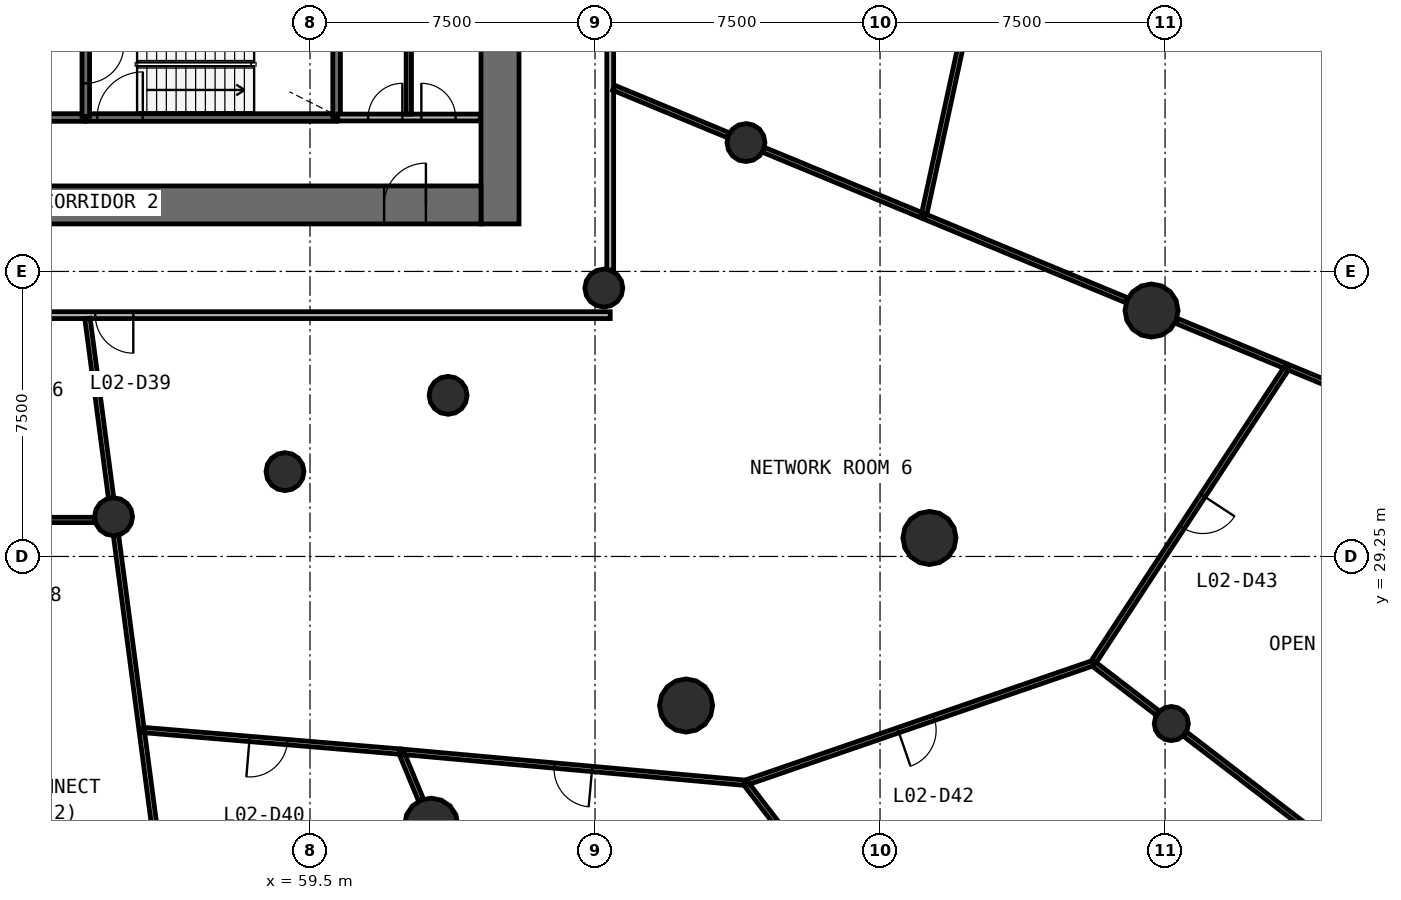
"""IFC4 building model, lengths in metres.
Left out: names, types, materials, properties, quantities, classifications, styles, units other than length and angle.
Written with IfcOpenShell. Run it as: python <this file> out.ifc"""

import sys

from ifc_helpers import new_model, si_unit, direction, frame, frame_2d, origin, origin_2d, place, context, subcontext, project, spatial, rectangle, circle, extrude, source, transform, mapped, element, fill, save


model = new_model("IFC4")
c1 = context("Model", 3, precision=1e-05, world=origin(), true_north=direction((0.0, 1.0)))
c2 = subcontext(c1, "Body", "Model", "MODEL_VIEW")
j1 = project(units=[si_unit("LENGTHUNIT", "METRE"), si_unit("PLANEANGLEUNIT", "RADIAN")], contexts=[c1])
p1 = place(None, origin())
s1 = spatial("IfcSite", under=j1, at=p1, CompositionType="ELEMENT")
p2 = place(p1, origin())
s2 = spatial("IfcBuilding", under=s1, at=p2, CompositionType="ELEMENT")
p3 = place(p2, frame((0.0, 0.0, 9.4)))
s3 = spatial("IfcBuildingStorey", under=s2, at=p3, CompositionType="ELEMENT", Elevation=9.4)
p4 = place(p3, frame((64.5, 38.0, 0.0), z_axis=(0.0, 0.0, 1.0), x_axis=(0.0, 1.0, 0.0)))
e1 = element("IfcWall", 1, at=p4, inside=s3, PredefinedType="SHEAR", context=c2, shape_type="SweptSolid", body=[
    extrude(rectangle(XDim=20.0, YDim=1.0, at=frame_2d((10.0, 0.0))), origin(), (0.0, 0.0, 1.0), 4.4),
])
p5 = place(p4, frame((9.1, 0.0, 0.0)))
e2 = element("IfcOpeningElement", 2, at=p5, cuts=e1, PredefinedType="OPENING", context=c2, shape_type="SweptSolid", body=[
    extrude(rectangle(XDim=1.8, YDim=2.1, at=frame_2d((0.9, 1.05))), frame((0.0, 0.51, 0.0), z_axis=(0.0, -1.0, 0.0), x_axis=(1.0, 0.0, 0.0)), (0.0, 0.0, 1.0), 1.02),
])
p6 = place(p3, frame((40.0, 38.5, 0.0), z_axis=(0.0, 0.0, 1.0), x_axis=(1.0, 0.0, 0.0)))
e3 = element("IfcWall", 3, at=p6, inside=s3, PredefinedType="SHEAR", context=c2, shape_type="SweptSolid", body=[
    extrude(rectangle(XDim=24.0, YDim=1.0, at=frame_2d((12.0, 0.0))), origin(), (0.0, 0.0, 1.0), 4.4),
])
p7 = place(p6, frame((21.45, 0.0, 0.0)))
e4 = element("IfcOpeningElement", 4, at=p7, cuts=e3, PredefinedType="OPENING", context=c2, shape_type="SweptSolid", body=[
    extrude(rectangle(XDim=1.1, YDim=2.1, at=frame_2d((0.55, 1.05))), frame((0.0, 0.51, 0.0), z_axis=(0.0, -1.0, 0.0), x_axis=(1.0, 0.0, 0.0)), (0.0, 0.0, 1.0), 1.02),
])
p8 = place(p6, frame((1.95, 0.0, 0.0)))
e5 = element("IfcOpeningElement", 5, at=p8, cuts=e3, PredefinedType="OPENING", context=c2, shape_type="SweptSolid", body=[
    extrude(rectangle(XDim=1.1, YDim=2.1, at=frame_2d((0.55, 1.05))), frame((0.0, 0.51, 0.0), z_axis=(0.0, -1.0, 0.0), x_axis=(1.0, 0.0, 0.0)), (0.0, 0.0, 1.0), 1.02),
])
m1 = source(origin(), c2, "Body", "SweptSolid", [
    extrude(circle(Radius=0.7, at=origin_2d()), origin(), (0.0, 0.0, 1.0), 4.4),
])
for number, where, z_axis, x_axis in (
    (6, (62.69, 22.191, 0.0), (0.0, 0.0, 1.0), (1.0, 0.0, 0.0)),
    (7, (69.396, 25.328, 0.0), (0.0, 0.0, 1.0), (1.0, 0.0, 0.0)),
    (8, (75.801, 29.737, 0.0), (0.0, 0.0, 1.0), (1.0, 0.0, 0.0)),
    (9, (81.645, 35.721, 0.0), (0.0, 0.0, 1.0), (1.0, 0.0, 0.0)),
):
    element("IfcColumn", number, at=place(p3, frame(where, z_axis=z_axis, x_axis=x_axis)), inside=s3, PredefinedType="COLUMN", context=c2, shape_type="MappedRepresentation", body=[
        mapped(m1, transform((0.0, 0.0, 0.0), scale=1.0)),
    ])
m2 = source(origin(), c2, "Body", "SweptSolid", [
    extrude(circle(Radius=0.5, at=origin_2d()), origin(), (0.0, 0.0, 1.0), 4.4),
])
for number, where, z_axis, x_axis in (
    (10, (54.331, 30.297, 0.0), (0.0, 0.0, 1.0), (1.0, 0.0, 0.0)),
    (11, (58.842, 31.482, 0.0), (0.0, 0.0, 1.0), (1.0, 0.0, 0.0)),
    (12, (63.134, 33.49, 0.0), (0.0, 0.0, 1.0), (1.0, 0.0, 0.0)),
    (13, (67.232, 36.312, 0.0), (0.0, 0.0, 1.0), (1.0, 0.0, 0.0)),
    (14, (70.972, 40.141, 0.0), (0.0, 0.0, 1.0), (1.0, 0.0, 0.0)),
):
    element("IfcColumn", number, at=place(p3, frame(where, z_axis=z_axis, x_axis=x_axis)), inside=s3, PredefinedType="COLUMN", context=c2, shape_type="MappedRepresentation", body=[
        mapped(m2, transform((0.0, 0.0, 0.0), scale=1.0)),
    ])
m3 = source(origin(), c2, "Body", "SweptSolid", [
    extrude(circle(Radius=0.45, at=origin_2d()), origin(), (0.0, 0.0, 1.0), 4.4),
])
p9 = place(p3, frame((82.165, 24.854, 0.0), z_axis=(0.0, 0.0, 1.0), x_axis=(1.0, 0.0, 0.0)))
e15 = element("IfcColumn", 15, at=p9, inside=s3, PredefinedType="COLUMN", context=c2, shape_type="MappedRepresentation", body=[
    mapped(m3, transform((0.0, 0.0, 0.0), scale=1.0)),
])
p10 = place(p3, frame((53.6, 40.8, 0.0), z_axis=(0.0, 0.0, 1.0), x_axis=(1.0, 0.0, 0.0)))
e16 = element("IfcWall", 16, at=p10, inside=s3, PredefinedType="SOLIDWALL", context=c2, shape_type="SweptSolid", body=[
    extrude(rectangle(XDim=6.6, YDim=0.2, at=frame_2d((3.3, 0.0))), origin(), (0.0, 0.0, 1.0), 3.95),
])
p11 = place(p10, frame((0.3, 0.0, 0.0)))
e17 = element("IfcOpeningElement", 17, at=p11, cuts=e16, PredefinedType="OPENING", context=c2, shape_type="SweptSolid", body=[
    extrude(rectangle(XDim=1.2, YDim=2.1, at=frame_2d((0.6, 1.05))), frame((0.0, 0.11, 0.0), z_axis=(0.0, -1.0, 0.0), x_axis=(1.0, 0.0, 0.0)), (0.0, 0.0, 1.0), 0.22),
])
p12 = place(p3, frame((47.9, 40.8, 0.0), z_axis=(0.0, 0.0, 1.0), x_axis=(1.0, 0.0, 0.0)))
e18 = element("IfcWall", 18, at=p12, inside=s3, PredefinedType="SOLIDWALL", context=c2, shape_type="SweptSolid", body=[
    extrude(rectangle(XDim=5.67, YDim=0.2, at=frame_2d((2.835, 0.0))), origin(), (0.0, 0.0, 1.0), 3.95),
])
p13 = place(p12, frame((2.95, 0.0, 0.0)))
e19 = element("IfcOpeningElement", 19, at=p13, cuts=e18, PredefinedType="OPENING", context=c2, shape_type="SweptSolid", body=[
    extrude(rectangle(XDim=1.1, YDim=2.1, at=frame_2d((0.55, 1.05))), frame((0.0, 0.11, 0.0), z_axis=(0.0, -1.0, 0.0), x_axis=(1.0, 0.0, 0.0)), (0.0, 0.0, 1.0), 0.22),
])
p14 = place(p3, frame((60.2, 40.83, 0.0), z_axis=(0.0, 0.0, 1.0), x_axis=(0.0, 1.0, 0.0)))
e20 = element("IfcWall", 20, at=p14, inside=s3, PredefinedType="SOLIDWALL", context=c2, shape_type="SweptSolid", body=[
    extrude(rectangle(XDim=2.77, YDim=0.2, at=frame_2d((1.385, 0.0))), origin(), (0.0, 0.0, 1.0), 3.95),
])
p15 = place(p3, frame((53.6, 43.6, 0.0), z_axis=(0.0, 0.0, 1.0), x_axis=(0.0, -1.0, 0.0)))
e21 = element("IfcWall", 21, at=p15, inside=s3, PredefinedType="SOLIDWALL", context=c2, shape_type="SweptSolid", body=[
    extrude(rectangle(XDim=2.77, YDim=0.2, at=frame_2d((1.385, 0.0))), origin(), (0.0, 0.0, 1.0), 3.95),
])
p16 = place(p15, frame((0.9, 0.0, 0.0)))
e22 = element("IfcOpeningElement", 22, at=p16, cuts=e21, PredefinedType="OPENING", context=c2, shape_type="SweptSolid", body=[
    extrude(rectangle(XDim=1.0, YDim=2.1, at=frame_2d((0.5, 1.05))), frame((0.0, 0.11, 0.0), z_axis=(0.0, -1.0, 0.0), x_axis=(1.0, 0.0, 0.0)), (0.0, 0.0, 1.0), 0.22),
])
p17 = place(p3, frame((67.4, 35.6, 0.0), z_axis=(0.0, 0.0, 1.0), x_axis=(-1.0, 0.0, 0.0)))
e23 = element("IfcWall", 23, at=p17, inside=s3, PredefinedType="PARTITIONING", context=c2, shape_type="SweptSolid", body=[
    extrude(rectangle(XDim=30.8, YDim=0.18, at=frame_2d((15.4, 0.0))), origin(), (0.0, 0.0, 1.0), 3.15),
])
p18 = place(p17, frame((14.95, 0.0, 0.0)))
e24 = element("IfcOpeningElement", 24, at=p18, cuts=e23, PredefinedType="OPENING", context=c2, shape_type="SweptSolid", body=[
    extrude(rectangle(XDim=1.0, YDim=2.1, at=frame_2d((0.5, 1.05))), frame((0.0, 0.1, 0.0), z_axis=(0.0, -1.0, 0.0), x_axis=(1.0, 0.0, 0.0)), (0.0, 0.0, 1.0), 0.2),
])
p19 = place(p17, frame((12.55, 0.0, 0.0)))
e25 = element("IfcOpeningElement", 25, at=p19, cuts=e23, PredefinedType="OPENING", context=c2, shape_type="SweptSolid", body=[
    extrude(rectangle(XDim=1.0, YDim=2.1, at=frame_2d((0.5, 1.05))), frame((0.0, 0.1, 0.0), z_axis=(0.0, -1.0, 0.0), x_axis=(1.0, 0.0, 0.0)), (0.0, 0.0, 1.0), 0.2),
])
p20 = place(p3, frame((67.4, 60.37, 0.0), z_axis=(0.0, 0.0, 1.0), x_axis=(0.0, -1.0, 0.0)))
e26 = element("IfcWall", 26, at=p20, inside=s3, PredefinedType="PARTITIONING", context=c2, shape_type="SweptSolid", body=[
    extrude(rectangle(XDim=23.583, YDim=0.18, at=frame_2d((11.791, 0.0))), origin(), (0.0, 0.0, 1.0), 3.15),
])
p21 = place(p20, frame((11.333, 0.0, 0.0)))
e27 = element("IfcOpeningElement", 27, at=p21, cuts=e26, PredefinedType="OPENING", context=c2, shape_type="SweptSolid", body=[
    extrude(rectangle(XDim=1.0, YDim=2.1, at=frame_2d((0.5, 1.05))), frame((0.0, 0.1, 0.0), z_axis=(0.0, -1.0, 0.0), x_axis=(1.0, 0.0, 0.0)), (0.0, 0.0, 1.0), 0.2),
])
p22 = place(p20, frame((4.532, 0.0, 0.0)))
e28 = element("IfcOpeningElement", 28, at=p22, cuts=e26, PredefinedType="OPENING", context=c2, shape_type="SweptSolid", body=[
    extrude(rectangle(XDim=1.0, YDim=2.1, at=frame_2d((0.5, 1.05))), frame((0.0, 0.1, 0.0), z_axis=(0.0, -1.0, 0.0), x_axis=(1.0, 0.0, 0.0)), (0.0, 0.0, 1.0), 0.2),
])
p23 = place(p3, frame((60.23, 40.8, 0.0), z_axis=(0.0, 0.0, 1.0), x_axis=(1.0, 0.0, 0.0)))
e29 = element("IfcWall", 29, at=p23, inside=s3, PredefinedType="PARTITIONING", context=c2, shape_type="SweptSolid", body=[
    extrude(rectangle(XDim=3.75, YDim=0.18, at=frame_2d((1.875, 0.0))), origin(), (0.0, 0.0, 1.0), 3.95),
])
p24 = place(p23, frame((0.8, 0.0, 0.0)))
e30 = element("IfcOpeningElement", 30, at=p24, cuts=e29, PredefinedType="OPENING", context=c2, shape_type="SweptSolid", body=[
    extrude(rectangle(XDim=0.9, YDim=2.1, at=frame_2d((0.45, 1.05))), frame((0.0, 0.1, 0.0), z_axis=(0.0, -1.0, 0.0), x_axis=(1.0, 0.0, 0.0)), (0.0, 0.0, 1.0), 0.2),
])
p25 = place(p23, frame((2.2, 0.0, 0.0)))
e31 = element("IfcOpeningElement", 31, at=p25, cuts=e29, PredefinedType="OPENING", context=c2, shape_type="SweptSolid", body=[
    extrude(rectangle(XDim=0.9, YDim=2.1, at=frame_2d((0.45, 1.05))), frame((0.0, 0.1, 0.0), z_axis=(0.0, -1.0, 0.0), x_axis=(1.0, 0.0, 0.0)), (0.0, 0.0, 1.0), 0.2),
])
p26 = place(p3, frame((80.097, 26.44, 0.0), z_axis=(0.0, 0.0, 1.0), x_axis=(-0.945541154245, -0.325502573922, 0.0)))
e32 = element("IfcWall", 32, at=p26, inside=s3, PredefinedType="PARTITIONING", context=c2, shape_type="SweptSolid", body=[
    extrude(rectangle(XDim=9.666, YDim=0.14, at=frame_2d((4.833, 0.0))), origin(), (0.0, 0.0, 1.0), 3.15),
])
p27 = place(p26, frame((4.416, 0.0, 0.0)))
e33 = element("IfcOpeningElement", 33, at=p27, cuts=e32, PredefinedType="OPENING", context=c2, shape_type="SweptSolid", body=[
    extrude(rectangle(XDim=1.0, YDim=2.1, at=frame_2d((0.5, 1.05))), frame((0.0, 0.08, 0.0), z_axis=(0.0, -1.0, 0.0), x_axis=(1.0, 0.0, 0.0)), (0.0, 0.0, 1.0), 0.16),
])
p28 = place(p3, frame((85.219, 34.24, 0.0), z_axis=(0.0, 0.0, 1.0), x_axis=(-0.548956837057, -0.835850699018, 0.0)))
e34 = element("IfcWall", 34, at=p28, inside=s3, PredefinedType="PARTITIONING", context=c2, shape_type="SweptSolid", body=[
    extrude(rectangle(XDim=9.301, YDim=0.14, at=frame_2d((4.651, 0.0))), origin(), (0.0, 0.0, 1.0), 3.15),
])
p29 = place(p28, frame((4.051, 0.0, 0.0)))
e35 = element("IfcOpeningElement", 35, at=p29, cuts=e34, PredefinedType="OPENING", context=c2, shape_type="SweptSolid", body=[
    extrude(rectangle(XDim=1.0, YDim=2.1, at=frame_2d((0.5, 1.05))), frame((0.0, 0.08, 0.0), z_axis=(0.0, -1.0, 0.0), x_axis=(1.0, 0.0, 0.0)), (0.0, 0.0, 1.0), 0.16),
])
p30 = place(p3, frame((70.927, 23.297, 0.0), z_axis=(0.0, 0.0, 1.0), x_axis=(-0.995938530205, 0.090035793182, 0.0)))
e36 = element("IfcWall", 36, at=p30, inside=s3, PredefinedType="PARTITIONING", context=c2, shape_type="SweptSolid", body=[
    extrude(rectangle(XDim=9.07, YDim=0.14, at=frame_2d((4.535, 0.0))), origin(), (0.0, 0.0, 1.0), 3.15),
])
p31 = place(p30, frame((4.021, 0.0, 0.0)))
e37 = element("IfcOpeningElement", 37, at=p31, cuts=e36, PredefinedType="OPENING", context=c2, shape_type="SweptSolid", body=[
    extrude(rectangle(XDim=1.0, YDim=2.1, at=frame_2d((0.5, 1.05))), frame((0.0, 0.08, 0.0), z_axis=(0.0, -1.0, 0.0), x_axis=(1.0, 0.0, 0.0)), (0.0, 0.0, 1.0), 0.16),
])
p32 = place(p3, frame((61.864, 24.116, 0.0), z_axis=(0.0, 0.0, 1.0), x_axis=(-0.996481261198, 0.083815846237, 0.0)))
e38 = element("IfcWall", 38, at=p32, inside=s3, PredefinedType="PARTITIONING", context=c2, shape_type="SweptSolid", body=[
    extrude(rectangle(XDim=6.819, YDim=0.14, at=frame_2d((3.409, 0.0))), origin(), (0.0, 0.0, 1.0), 3.15),
])
p33 = place(p32, frame((2.969, 0.0, 0.0)))
e39 = element("IfcOpeningElement", 39, at=p33, cuts=e38, PredefinedType="OPENING", context=c2, shape_type="SweptSolid", body=[
    extrude(rectangle(XDim=1.0, YDim=2.1, at=frame_2d((0.5, 1.05))), frame((0.0, 0.08, 0.0), z_axis=(0.0, -1.0, 0.0), x_axis=(1.0, 0.0, 0.0)), (0.0, 0.0, 1.0), 0.16),
])
p34 = place(p3, frame((75.65, 38.204, 0.0), z_axis=(0.0, 0.0, 1.0), x_axis=(0.212219247402, 0.977222078666, 0.0)))
e40 = element("IfcWall", 40, at=p34, inside=s3, PredefinedType="PARTITIONING", context=c2, shape_type="SweptSolid", body=[
    extrude(rectangle(XDim=6.648, YDim=0.14, at=frame_2d((3.324, 0.0))), origin(), (0.0, 0.0, 1.0), 3.15),
])
p35 = place(p3, frame((75.677, 38.192, 0.0), z_axis=(0.0, 0.0, 1.0), x_axis=(0.923874610175, -0.38269531572, 0.0)))
e41 = element("IfcWall", 41, at=p35, inside=s3, PredefinedType="PARTITIONING", context=c2, shape_type="SweptSolid", body=[
    extrude(rectangle(XDim=5.754, YDim=0.14, at=frame_2d((2.877, 0.0))), origin(), (0.0, 0.0, 1.0), 3.15),
])
p36 = place(p3, frame((54.396, 29.797, 0.0), z_axis=(0.0, 0.0, 1.0), x_axis=(0.130530944133, -0.991444235761, 0.0)))
e42 = element("IfcWall", 42, at=p36, inside=s3, PredefinedType="PARTITIONING", context=c2, shape_type="SweptSolid", body=[
    extrude(rectangle(XDim=5.123, YDim=0.14, at=frame_2d((2.562, 0.0))), origin(), (0.0, 0.0, 1.0), 3.15),
])
p37 = place(p3, frame((53.644, 35.51, 0.0), z_axis=(0.0, 0.0, 1.0), x_axis=(0.130548834981, -0.991441880135, 0.0)))
e43 = element("IfcWall", 43, at=p37, inside=s3, PredefinedType="PARTITIONING", context=c2, shape_type="SweptSolid", body=[
    extrude(rectangle(XDim=4.754, YDim=0.14, at=frame_2d((2.377, 0.0))), origin(), (0.0, 0.0, 1.0), 3.15),
])
p38 = place(p3, frame((71.439, 39.948, 0.0), z_axis=(0.0, 0.0, 1.0), x_axis=(0.923881526718, -0.382678617888, 0.0)))
e44 = element("IfcWall", 44, at=p38, inside=s3, PredefinedType="PARTITIONING", context=c2, shape_type="SweptSolid", body=[
    extrude(rectangle(XDim=4.486, YDim=0.14, at=frame_2d((2.243, 0.0))), origin(), (0.0, 0.0, 1.0), 3.15),
])
p39 = place(p3, frame((82.525, 24.577, 0.0), z_axis=(0.0, 0.0, 1.0), x_axis=(0.793377694402, -0.608729688799, 0.0)))
e45 = element("IfcWall", 45, at=p39, inside=s3, PredefinedType="PARTITIONING", context=c2, shape_type="SweptSolid", body=[
    extrude(rectangle(XDim=4.091, YDim=0.14, at=frame_2d((2.045, 0.0))), origin(), (0.0, 0.0, 1.0), 3.15),
])
p40 = place(p3, frame((85.247, 34.229, 0.0), z_axis=(0.0, 0.0, 1.0), x_axis=(0.92387965154, -0.382683145003, 0.0)))
e46 = element("IfcWall", 46, at=p40, inside=s3, PredefinedType="PARTITIONING", context=c2, shape_type="SweptSolid", body=[
    extrude(rectangle(XDim=3.904, YDim=0.14, at=frame_2d((1.952, 0.0))), origin(), (0.0, 0.0, 1.0), 3.15),
])
p41 = place(p3, frame((55.079, 24.617, 0.0), z_axis=(0.0, 0.0, 1.0), x_axis=(0.130498239391, -0.991448541033, 0.0)))
e47 = element("IfcWall", 47, at=p41, inside=s3, PredefinedType="PARTITIONING", context=c2, shape_type="SweptSolid", body=[
    extrude(rectangle(XDim=3.611, YDim=0.14, at=frame_2d((1.805, 0.0))), origin(), (0.0, 0.0, 1.0), 3.15),
])
p42 = place(p3, frame((53.833, 30.211, 0.0), z_axis=(0.0, 0.0, 1.0), x_axis=(-1.0, 0.0, 0.0)))
e48 = element("IfcWall", 48, at=p42, inside=s3, PredefinedType="PARTITIONING", context=c2, shape_type="SweptSolid", body=[
    extrude(rectangle(XDim=3.669, YDim=0.14, at=frame_2d((1.834, 0.0))), origin(), (0.0, 0.0, 1.0), 3.15),
])
p43 = place(p42, frame((1.419, 0.0, 0.0)))
e49 = element("IfcOpeningElement", 49, at=p43, cuts=e48, PredefinedType="OPENING", context=c2, shape_type="SweptSolid", body=[
    extrude(rectangle(XDim=1.0, YDim=2.1, at=frame_2d((0.5, 1.05))), frame((0.0, 0.08, 0.0), z_axis=(0.0, -1.0, 0.0), x_axis=(1.0, 0.0, 0.0)), (0.0, 0.0, 1.0), 0.16),
])
p44 = place(p3, frame((67.49, 41.584, 0.0), z_axis=(0.0, 0.0, 1.0), x_axis=(0.923911109142, -0.382607190737, 0.0)))
e50 = element("IfcWall", 50, at=p44, inside=s3, PredefinedType="PARTITIONING", context=c2, shape_type="SweptSolid", body=[
    extrude(rectangle(XDim=3.264, YDim=0.14, at=frame_2d((1.632, 0.0))), origin(), (0.0, 0.0, 1.0), 3.15),
])
p45 = place(p3, frame((82.296, 35.451, 0.0), z_axis=(0.0, 0.0, 1.0), x_axis=(0.923889850499, -0.382658521591, 0.0)))
e51 = element("IfcWall", 51, at=p45, inside=s3, PredefinedType="PARTITIONING", context=c2, shape_type="SweptSolid", body=[
    extrude(rectangle(XDim=3.093, YDim=0.14, at=frame_2d((1.546, 0.0))), origin(), (0.0, 0.0, 1.0), 3.15),
])
p46 = place(p3, frame((71.002, 23.236, 0.0), z_axis=(0.0, 0.0, 1.0), x_axis=(0.608806836057, -0.793318496173, 0.0)))
e52 = element("IfcWall", 52, at=p46, inside=s3, PredefinedType="PARTITIONING", context=c2, shape_type="SweptSolid", body=[
    extrude(rectangle(XDim=2.99, YDim=0.14, at=frame_2d((1.495, 0.0))), origin(), (0.0, 0.0, 1.0), 3.15),
])
p47 = place(p3, frame((62.1, 40.89, 0.0), z_axis=(0.0, 0.0, 1.0), x_axis=(0.0, 1.0, 0.0)))
e53 = element("IfcWall", 53, at=p47, inside=s3, PredefinedType="PARTITIONING", context=c2, shape_type="SweptSolid", body=[
    extrude(rectangle(XDim=2.71, YDim=0.14, at=frame_2d((1.355, 0.0))), origin(), (0.0, 0.0, 1.0), 3.15),
])
p48 = place(p3, frame((80.121, 26.422, 0.0), z_axis=(0.0, 0.0, 1.0), x_axis=(0.793337757309, -0.608781736609, 0.0)))
e54 = element("IfcWall", 54, at=p48, inside=s3, PredefinedType="PARTITIONING", context=c2, shape_type="SweptSolid", body=[
    extrude(rectangle(XDim=2.122, YDim=0.14, at=frame_2d((1.061, 0.0))), origin(), (0.0, 0.0, 1.0), 3.15),
])
p49 = place(p3, frame((61.924, 24.041, 0.0), z_axis=(0.0, 0.0, 1.0), x_axis=(0.382595690084, -0.923915871673, 0.0)))
e55 = element("IfcWall", 55, at=p49, inside=s3, PredefinedType="PARTITIONING", context=c2, shape_type="SweptSolid", body=[
    extrude(rectangle(XDim=1.297, YDim=0.14, at=frame_2d((0.648, 0.0))), origin(), (0.0, 0.0, 1.0), 3.15),
])
m4 = source(origin(), c2, "Body", "SweptSolid", [
    extrude(rectangle(XDim=1.2, YDim=2.1, at=frame_2d((0.6, 1.05))), frame((0.0, 0.025, 0.0), z_axis=(0.0, -1.0, 0.0), x_axis=(1.0, 0.0, 0.0)), (0.0, 0.0, 1.0), 0.05),
])
p50 = place(p11, origin())
e56 = element("IfcDoor", 56, at=p50, inside=s3, OperationType="SINGLE_SWING_RIGHT", PredefinedType="DOOR", context=c2, shape_type="MappedRepresentation", body=[
    mapped(m4, transform((0.0, 0.0, 0.0), scale=1.0)),
])
fill(e17, e56)
m5 = source(origin(), c2, "Body", "SweptSolid", [
    extrude(rectangle(XDim=1.0, YDim=2.1, at=frame_2d((0.5, 1.05))), frame((0.0, 0.025, 0.0), z_axis=(0.0, -1.0, 0.0), x_axis=(1.0, 0.0, 0.0)), (0.0, 0.0, 1.0), 0.05),
])
p51 = place(p16, origin())
e57 = element("IfcDoor", 57, at=p51, inside=s3, OperationType="SINGLE_SWING_LEFT", PredefinedType="DOOR", context=c2, shape_type="MappedRepresentation", body=[
    mapped(m5, transform((0.0, 0.0, 0.0), scale=1.0)),
])
fill(e22, e57)
m6 = source(origin(), c2, "Body", "SweptSolid", [
    extrude(rectangle(XDim=1.1, YDim=2.1, at=frame_2d((0.55, 1.05))), frame((0.0, 0.025, 0.0), z_axis=(0.0, -1.0, 0.0), x_axis=(1.0, 0.0, 0.0)), (0.0, 0.0, 1.0), 0.05),
])
p52 = place(p7, origin())
e58 = element("IfcDoor", 58, at=p52, inside=s3, OperationType="SINGLE_SWING_RIGHT", PredefinedType="DOOR", context=c2, shape_type="MappedRepresentation", body=[
    mapped(m6, transform((0.0, 0.0, 0.0), scale=1.0)),
])
fill(e4, e58)
m7 = source(origin(), c2, "Body", "SweptSolid", [
    extrude(rectangle(XDim=1.0, YDim=2.1, at=frame_2d((0.5, 1.05))), frame((0.0, 0.025, 0.0), z_axis=(0.0, -1.0, 0.0), x_axis=(1.0, 0.0, 0.0)), (0.0, 0.0, 1.0), 0.05),
])
p53 = place(p19, origin())
e59 = element("IfcDoor", 59, at=p53, inside=s3, OperationType="SINGLE_SWING_LEFT", PredefinedType="DOOR", context=c2, shape_type="MappedRepresentation", body=[
    mapped(m7, transform((0.0, 0.0, 0.0), scale=1.0)),
])
fill(e25, e59)
p54 = place(p33, origin())
e60 = element("IfcDoor", 60, at=p54, inside=s3, OperationType="SINGLE_SWING_RIGHT", PredefinedType="DOOR", context=c2, shape_type="MappedRepresentation", body=[
    mapped(m7, transform((0.0, 0.0, 0.0), scale=1.0)),
])
fill(e39, e60)
p55 = place(p31, origin())
e61 = element("IfcDoor", 61, at=p55, inside=s3, OperationType="SINGLE_SWING_LEFT", PredefinedType="DOOR", context=c2, shape_type="MappedRepresentation", body=[
    mapped(m7, transform((0.0, 0.0, 0.0), scale=1.0)),
])
fill(e37, e61)
p56 = place(p27, origin())
e62 = element("IfcDoor", 62, at=p56, inside=s3, OperationType="SINGLE_SWING_RIGHT", PredefinedType="DOOR", context=c2, shape_type="MappedRepresentation", body=[
    mapped(m7, transform((0.0, 0.0, 0.0), scale=1.0)),
])
fill(e33, e62)
p57 = place(p29, origin())
e63 = element("IfcDoor", 63, at=p57, inside=s3, OperationType="SINGLE_SWING_LEFT", PredefinedType="DOOR", context=c2, shape_type="MappedRepresentation", body=[
    mapped(m7, transform((0.0, 0.0, 0.0), scale=1.0)),
])
fill(e35, e63)
m8 = source(origin(), c2, "Body", "SweptSolid", [
    extrude(rectangle(XDim=0.9, YDim=2.1, at=frame_2d((0.45, 1.05))), frame((0.0, 0.025, 0.0), z_axis=(0.0, -1.0, 0.0), x_axis=(1.0, 0.0, 0.0)), (0.0, 0.0, 1.0), 0.05),
])
p58 = place(p24, origin())
e64 = element("IfcDoor", 64, at=p58, inside=s3, OperationType="SINGLE_SWING_RIGHT", PredefinedType="DOOR", context=c2, shape_type="MappedRepresentation", body=[
    mapped(m8, transform((0.0, 0.0, 0.0), scale=1.0)),
])
fill(e30, e64)
p59 = place(p25, origin())
e65 = element("IfcDoor", 65, at=p59, inside=s3, OperationType="SINGLE_SWING_LEFT", PredefinedType="DOOR", context=c2, shape_type="MappedRepresentation", body=[
    mapped(m8, transform((0.0, 0.0, 0.0), scale=1.0)),
])
fill(e31, e65)
save(model, sys.argv[1])
